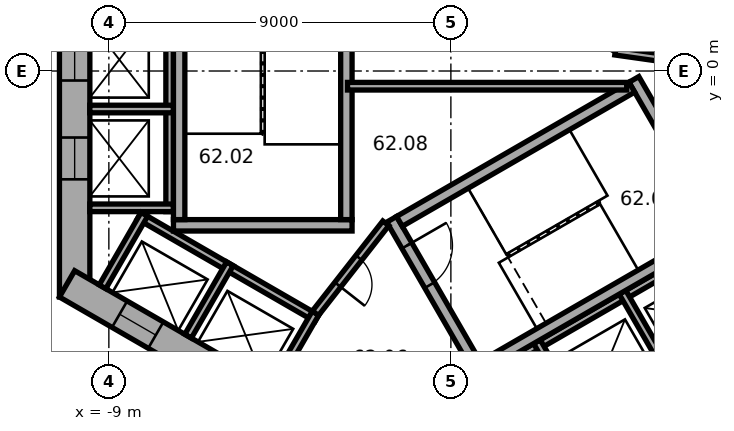
"""IFC4 building model, lengths in metres.
Left out: names, types, materials, properties, quantities, classifications, styles, units other than length and angle.
Written with IfcOpenShell. Run it as: python <this file> out.ifc"""

import sys

from ifc_helpers import new_model, si_unit, direction, frame, frame_2d, origin, place, context, subcontext, project, spatial, rectangle, extrude, element, fill, save


model = new_model("IFC4")
c1 = context("Model", 3, precision=1e-05, world=origin(), true_north=direction((0.0, 1.0)))
c2 = subcontext(c1, "Body", "Model", "MODEL_VIEW")
j1 = project(units=[si_unit("LENGTHUNIT", "METRE"), si_unit("PLANEANGLEUNIT", "RADIAN")], contexts=[c1])
p1 = place(None, origin())
s1 = spatial("IfcSite", under=j1, at=p1, CompositionType="ELEMENT")
p2 = place(p1, origin())
s2 = spatial("IfcBuilding", under=s1, at=p2, CompositionType="ELEMENT")
p3 = place(p2, frame((0.0, 0.0, 251.3)))
s3 = spatial("IfcBuildingStorey", under=s2, at=p3, CompositionType="ELEMENT", Elevation=251.3)
p4 = place(p3, frame((-9.9, 5.947, 0.0), z_axis=(0.0, 0.0, 1.0), x_axis=(0.0, -1.0, 0.0)))
e1 = element("IfcWall", 1, at=p4, inside=s3, PredefinedType="SHEAR", context=c2, shape_type="SweptSolid", body=[
    extrude(rectangle(XDim=11.894, YDim=0.8, at=frame_2d((5.947, 0.0))), origin(), (0.0, 0.0, 1.0), 3.7),
])
p5 = place(p4, frame((5.097, 0.0, 0.0)))
e2 = element("IfcOpeningElement", 2, at=p5, cuts=e1, PredefinedType="OPENING", context=c2, shape_type="SweptSolid", body=[
    extrude(rectangle(XDim=1.1, YDim=2.1, at=frame_2d((0.55, 1.05))), frame((0.0, 0.41, 0.0), z_axis=(0.0, -1.0, 0.0), x_axis=(1.0, 0.0, 0.0)), (0.0, 0.0, 1.0), 0.82),
])
p6 = place(p4, frame((7.697, 0.0, 0.0)))
e3 = element("IfcOpeningElement", 3, at=p6, cuts=e1, PredefinedType="OPENING", context=c2, shape_type="SweptSolid", body=[
    extrude(rectangle(XDim=1.1, YDim=2.1, at=frame_2d((0.55, 1.05))), frame((0.0, 0.41, 0.0), z_axis=(0.0, -1.0, 0.0), x_axis=(1.0, 0.0, 0.0)), (0.0, 0.0, 1.0), 0.82),
])
p7 = place(p3, frame((-10.1, -5.6, 0.0), z_axis=(0.0, 0.0, 1.0), x_axis=(0.866023897231, -0.500002609418, 0.0)))
e4 = element("IfcWall", 4, at=p7, inside=s3, PredefinedType="SHEAR", context=c2, shape_type="SweptSolid", body=[
    extrude(rectangle(XDim=11.894, YDim=0.8, at=frame_2d((5.947, 0.0))), origin(), (0.0, 0.0, 1.0), 3.7),
])
p8 = place(p7, frame((6.147, 0.0, 0.0)))
e5 = element("IfcOpeningElement", 5, at=p8, cuts=e4, PredefinedType="OPENING", context=c2, shape_type="SweptSolid", body=[
    extrude(rectangle(XDim=1.5, YDim=2.1, at=frame_2d((0.75, 1.05))), frame((0.0, 0.41, 0.0), z_axis=(0.0, -1.0, 0.0), x_axis=(1.0, 0.0, 0.0)), (0.0, 0.0, 1.0), 0.82),
])
p9 = place(p7, frame((1.597, 0.0, 0.0)))
e6 = element("IfcOpeningElement", 6, at=p9, cuts=e4, PredefinedType="OPENING", context=c2, shape_type="SweptSolid", body=[
    extrude(rectangle(XDim=1.1, YDim=2.1, at=frame_2d((0.55, 1.05))), frame((0.0, 0.41, 0.0), z_axis=(0.0, -1.0, 0.0), x_axis=(1.0, 0.0, 0.0)), (0.0, 0.0, 1.0), 0.82),
])
p10 = place(p7, frame((4.197, 0.0, 0.0)))
e7 = element("IfcOpeningElement", 7, at=p10, cuts=e4, PredefinedType="OPENING", context=c2, shape_type="SweptSolid", body=[
    extrude(rectangle(XDim=1.1, YDim=2.1, at=frame_2d((0.55, 1.05))), frame((0.0, 0.41, 0.0), z_axis=(0.0, -1.0, 0.0), x_axis=(1.0, 0.0, 0.0)), (0.0, 0.0, 1.0), 0.82),
])
p11 = place(p3, frame((-0.2, -11.547, 0.0), z_axis=(0.0, 0.0, 1.0), x_axis=(0.866023897231, 0.500002609418, 0.0)))
e8 = element("IfcWall", 8, at=p11, inside=s3, PredefinedType="SHEAR", context=c2, shape_type="SweptSolid", body=[
    extrude(rectangle(XDim=11.894, YDim=0.8, at=frame_2d((5.947, 0.0))), origin(), (0.0, 0.0, 1.0), 3.7),
])
p12 = place(p11, frame((2.497, 0.0, 0.0)))
e9 = element("IfcOpeningElement", 9, at=p12, cuts=e8, PredefinedType="OPENING", context=c2, shape_type="SweptSolid", body=[
    extrude(rectangle(XDim=1.1, YDim=2.1, at=frame_2d((0.55, 1.05))), frame((0.0, 0.41, 0.0), z_axis=(0.0, -1.0, 0.0), x_axis=(1.0, 0.0, 0.0)), (0.0, 0.0, 1.0), 0.82),
])
p13 = place(p11, frame((5.097, 0.0, 0.0)))
e10 = element("IfcOpeningElement", 10, at=p13, cuts=e8, PredefinedType="OPENING", context=c2, shape_type="SweptSolid", body=[
    extrude(rectangle(XDim=1.1, YDim=2.1, at=frame_2d((0.55, 1.05))), frame((0.0, 0.41, 0.0), z_axis=(0.0, -1.0, 0.0), x_axis=(1.0, 0.0, 0.0)), (0.0, 0.0, 1.0), 0.82),
])
p14 = place(p11, frame((7.697, 0.0, 0.0)))
e11 = element("IfcOpeningElement", 11, at=p14, cuts=e8, PredefinedType="OPENING", context=c2, shape_type="SweptSolid", body=[
    extrude(rectangle(XDim=1.1, YDim=2.1, at=frame_2d((0.55, 1.05))), frame((0.0, 0.41, 0.0), z_axis=(0.0, -1.0, 0.0), x_axis=(1.0, 0.0, 0.0)), (0.0, 0.0, 1.0), 0.82),
])
p15 = place(p3, frame((-7.4, 4.3, 0.0), z_axis=(0.0, 0.0, 1.0), x_axis=(0.0, -1.0, 0.0)))
e12 = element("IfcWall", 12, at=p15, inside=s3, PredefinedType="PARTITIONING", context=c2, shape_type="SweptSolid", body=[
    extrude(rectangle(XDim=8.0, YDim=0.2, at=frame_2d((4.0, 0.0))), origin(), (0.0, 0.0, 1.0), 3.35),
])
for number, where, z_axis, x_axis in (
    (13, (-7.3, -1.0, 0.0), (0.0, 0.0, 1.0), (-1.0, 0.0, 0.0)),
    (14, (-7.3, -3.6, 0.0), (0.0, 0.0, 1.0), (-1.0, 0.0, 0.0)),
):
    element("IfcWall", number, at=place(p3, frame(where, z_axis=z_axis, x_axis=x_axis)), inside=s3, PredefinedType="PARTITIONING", context=c2, shape_type="SweptSolid", body=[
        extrude(rectangle(XDim=2.2, YDim=0.2, at=frame_2d((1.1, 0.0))), origin(), (0.0, 0.0, 1.0), 3.35),
    ])
p16 = place(p3, frame((-8.203, -3.809, 0.0), z_axis=(0.0, 0.0, 1.0), x_axis=(0.866028230842, -0.499995103361, 0.0)))
e15 = element("IfcWall", 15, at=p16, inside=s3, PredefinedType="PARTITIONING", context=c2, shape_type="SweptSolid", body=[
    extrude(rectangle(XDim=5.4, YDim=0.2, at=frame_2d((2.7, 0.0))), origin(), (0.0, 0.0, 1.0), 3.35),
])
for number, where, z_axis, x_axis in (
    (16, (-8.067, -3.772, 0.0), (0.0, 0.0, 1.0), (-0.5, -0.866, 0.0)),
    (17, (-5.815, -5.072, 0.0), (0.0, 0.0, 1.0), (-0.5, -0.866, 0.0)),
):
    element("IfcWall", number, at=place(p3, frame(where, z_axis=z_axis, x_axis=x_axis)), inside=s3, PredefinedType="PARTITIONING", context=c2, shape_type="SweptSolid", body=[
        extrude(rectangle(XDim=2.2, YDim=0.2, at=frame_2d((1.1, 0.0))), origin(), (0.0, 0.0, 1.0), 3.35),
    ])
p17 = place(p3, frame((-3.563, -6.372, 0.0), z_axis=(0.0, 0.0, 1.0), x_axis=(-0.499994660107, -0.866028486751, 0.0)))
e18 = element("IfcWall", 18, at=p17, inside=s3, PredefinedType="PARTITIONING", context=c2, shape_type="SweptSolid", body=[
    extrude(rectangle(XDim=2.2, YDim=0.2, at=frame_2d((1.1, 0.0))), origin(), (0.0, 0.0, 1.0), 3.35),
])
p18 = place(p3, frame((-0.024, -8.559, 0.0), z_axis=(0.0, 0.0, 1.0), x_axis=(0.866026010844, 0.49999894854, 0.0)))
e19 = element("IfcWall", 19, at=p18, inside=s3, PredefinedType="PARTITIONING", context=c2, shape_type="SweptSolid", body=[
    extrude(rectangle(XDim=8.0, YDim=0.2, at=frame_2d((4.0, 0.0))), origin(), (0.0, 0.0, 1.0), 3.35),
])
for number, where, z_axis, x_axis in (
    (20, (2.264, -7.122, 0.0), (0.0, 0.0, 1.0), (0.5, -0.866, 0.0)),
    (21, (4.516, -5.822, 0.0), (0.0, 0.0, 1.0), (0.5, -0.866, 0.0)),
):
    element("IfcWall", number, at=place(p3, frame(where, z_axis=z_axis, x_axis=x_axis)), inside=s3, PredefinedType="PARTITIONING", context=c2, shape_type="SweptSolid", body=[
        extrude(rectangle(XDim=2.2, YDim=0.2, at=frame_2d((1.1, 0.0))), origin(), (0.0, 0.0, 1.0), 3.35),
    ])
p19 = place(p3, frame((-2.6, -4.06, 0.0), z_axis=(0.0, 0.0, 1.0), x_axis=(-1.0, 0.0, 0.0)))
e22 = element("IfcWall", 22, at=p19, inside=s3, PredefinedType="SHEAR", context=c2, shape_type="SweptSolid", body=[
    extrude(rectangle(XDim=4.7, YDim=0.3, at=frame_2d((2.35, 0.0))), origin(), (0.0, 0.0, 1.0), 3.35),
])
for number, where, z_axis, x_axis in (
    (23, (-2.75, 3.15, 0.0), (0.0, 0.0, 1.0), (0.0, -1.0, 0.0)),
    (24, (-7.15, 3.15, 0.0), (0.0, 0.0, 1.0), (0.0, -1.0, 0.0)),
):
    element("IfcWall", number, at=place(p3, frame(where, z_axis=z_axis, x_axis=x_axis)), inside=s3, PredefinedType="SHEAR", context=c2, shape_type="SweptSolid", body=[
        extrude(rectangle(XDim=7.06, YDim=0.3, at=frame_2d((3.53, 0.0))), origin(), (0.0, 0.0, 1.0), 3.35),
    ])
p20 = place(p3, frame((-1.558, -3.902, 0.0), z_axis=(0.0, 0.0, 1.0), x_axis=(0.499977259774, -0.866038532462, 0.0)))
e25 = element("IfcWall", 25, at=p20, inside=s3, PredefinedType="SHEAR", context=c2, shape_type="SweptSolid", body=[
    extrude(rectangle(XDim=4.7, YDim=0.3, at=frame_2d((2.35, 0.0))), origin(), (0.0, 0.0, 1.0), 3.35),
])
p21 = place(p20, frame((0.8, 0.0, 0.0)))
e26 = element("IfcOpeningElement", 26, at=p21, cuts=e25, PredefinedType="OPENING", context=c2, shape_type="SweptSolid", body=[
    extrude(rectangle(XDim=1.2, YDim=2.1, at=frame_2d((0.6, 1.05))), frame((0.0, 0.16, 0.0), z_axis=(0.0, -1.0, 0.0), x_axis=(1.0, 0.0, 0.0)), (0.0, 0.0, 1.0), 0.32),
])
p22 = place(p3, frame((4.816, -0.222, 0.0), z_axis=(0.0, 0.0, 1.0), x_axis=(0.499977259774, -0.866038532462, 0.0)))
e27 = element("IfcWall", 27, at=p22, inside=s3, PredefinedType="SHEAR", context=c2, shape_type="SweptSolid", body=[
    extrude(rectangle(XDim=4.7, YDim=0.3, at=frame_2d((2.35, 0.0))), origin(), (0.0, 0.0, 1.0), 3.35),
])
for number, where, z_axis, x_axis in (
    (28, (-1.353, -3.957, 0.0), (0.0, 0.0, 1.0), (0.866, 0.5, 0.0)),
    (29, (0.847, -7.767, 0.0), (0.0, 0.0, 1.0), (0.866, 0.5, 0.0)),
):
    element("IfcWall", number, at=place(p3, frame(where, z_axis=z_axis, x_axis=x_axis)), inside=s3, PredefinedType="SHEAR", context=c2, shape_type="SweptSolid", body=[
        extrude(rectangle(XDim=7.06, YDim=0.3, at=frame_2d((3.53, 0.0))), origin(), (0.0, 0.0, 1.0), 3.35),
    ])
p23 = place(p3, frame((4.327, 0.521, 0.0), z_axis=(0.0, 0.0, 1.0), x_axis=(0.990124376366, -0.14019172346, 0.0)))
e30 = element("IfcWall", 30, at=p23, inside=s3, PredefinedType="PARTITIONING", context=c2, shape_type="SweptSolid", body=[
    extrude(rectangle(XDim=3.002, YDim=0.2, at=frame_2d((1.501, 0.0))), origin(), (0.0, 0.0, 1.0), 3.35),
])
p24 = place(p3, frame((-1.712, -4.008, 0.0), z_axis=(0.0, 0.0, 1.0), x_axis=(-0.616549420702, -0.787316208287, 0.0)))
e31 = element("IfcWall", 31, at=p24, inside=s3, PredefinedType="PARTITIONING", context=c2, shape_type="SweptSolid", body=[
    extrude(rectangle(XDim=3.002, YDim=0.2, at=frame_2d((1.501, 0.0))), origin(), (0.0, 0.0, 1.0), 3.35),
])
p25 = place(p24, frame((1.15, 0.0, 0.0)))
e32 = element("IfcOpeningElement", 32, at=p25, cuts=e31, PredefinedType="OPENING", context=c2, shape_type="SweptSolid", body=[
    extrude(rectangle(XDim=0.9, YDim=2.1, at=frame_2d((0.45, 1.05))), frame((0.0, 0.11, 0.0), z_axis=(0.0, -1.0, 0.0), x_axis=(1.0, 0.0, 0.0)), (0.0, 0.0, 1.0), 0.22),
])
p26 = place(p3, frame((-2.72, -0.4, 0.0), z_axis=(0.0, 0.0, 1.0), x_axis=(1.0, 0.0, 0.0)))
e33 = element("IfcWall", 33, at=p26, inside=s3, PredefinedType="PARTITIONING", context=c2, shape_type="SweptSolid", body=[
    extrude(rectangle(XDim=7.347, YDim=0.2, at=frame_2d((3.674, 0.0))), origin(), (0.0, 0.0, 1.0), 3.35),
])
p27 = place(p21, origin())
e34 = element("IfcDoor", 34, at=p27, inside=s3, OperationType="SINGLE_SWING_RIGHT", PredefinedType="DOOR", context=c2, shape_type="SweptSolid", body=[
    extrude(rectangle(XDim=1.2, YDim=2.1, at=frame_2d((0.6, 1.05))), frame((0.0, 0.025, 0.0), z_axis=(0.0, -1.0, 0.0), x_axis=(1.0, 0.0, 0.0)), (0.0, 0.0, 1.0), 0.05),
])
fill(e26, e34)
p28 = place(p25, origin())
e35 = element("IfcDoor", 35, at=p28, inside=s3, OperationType="SINGLE_SWING_LEFT", PredefinedType="DOOR", context=c2, shape_type="SweptSolid", body=[
    extrude(rectangle(XDim=0.9, YDim=2.1, at=frame_2d((0.45, 1.05))), frame((0.0, 0.025, 0.0), z_axis=(0.0, -1.0, 0.0), x_axis=(1.0, 0.0, 0.0)), (0.0, 0.0, 1.0), 0.05),
])
fill(e32, e35)
p29 = place(p5, origin())
e36 = element("IfcDoor", 36, at=p29, inside=s3, OperationType="DOUBLE_DOOR_SLIDING", PredefinedType="DOOR", context=c2, shape_type="SweptSolid", body=[
    extrude(rectangle(XDim=1.1, YDim=2.1, at=frame_2d((0.55, 1.05))), frame((0.0, 0.025, 0.0), z_axis=(0.0, -1.0, 0.0), x_axis=(1.0, 0.0, 0.0)), (0.0, 0.0, 1.0), 0.05),
])
fill(e2, e36)
p30 = place(p6, origin())
e37 = element("IfcDoor", 37, at=p30, inside=s3, OperationType="DOUBLE_DOOR_SLIDING", PredefinedType="DOOR", context=c2, shape_type="SweptSolid", body=[
    extrude(rectangle(XDim=1.1, YDim=2.1, at=frame_2d((0.55, 1.05))), frame((0.0, 0.025, 0.0), z_axis=(0.0, -1.0, 0.0), x_axis=(1.0, 0.0, 0.0)), (0.0, 0.0, 1.0), 0.05),
])
fill(e3, e37)
p31 = place(p9, origin())
e38 = element("IfcDoor", 38, at=p31, inside=s3, OperationType="DOUBLE_DOOR_SLIDING", PredefinedType="DOOR", context=c2, shape_type="SweptSolid", body=[
    extrude(rectangle(XDim=1.1, YDim=2.1, at=frame_2d((0.55, 1.05))), frame((0.0, 0.025, 0.0), z_axis=(0.0, -1.0, 0.0), x_axis=(1.0, 0.0, 0.0)), (0.0, 0.0, 1.0), 0.05),
])
fill(e6, e38)
save(model, sys.argv[1])
